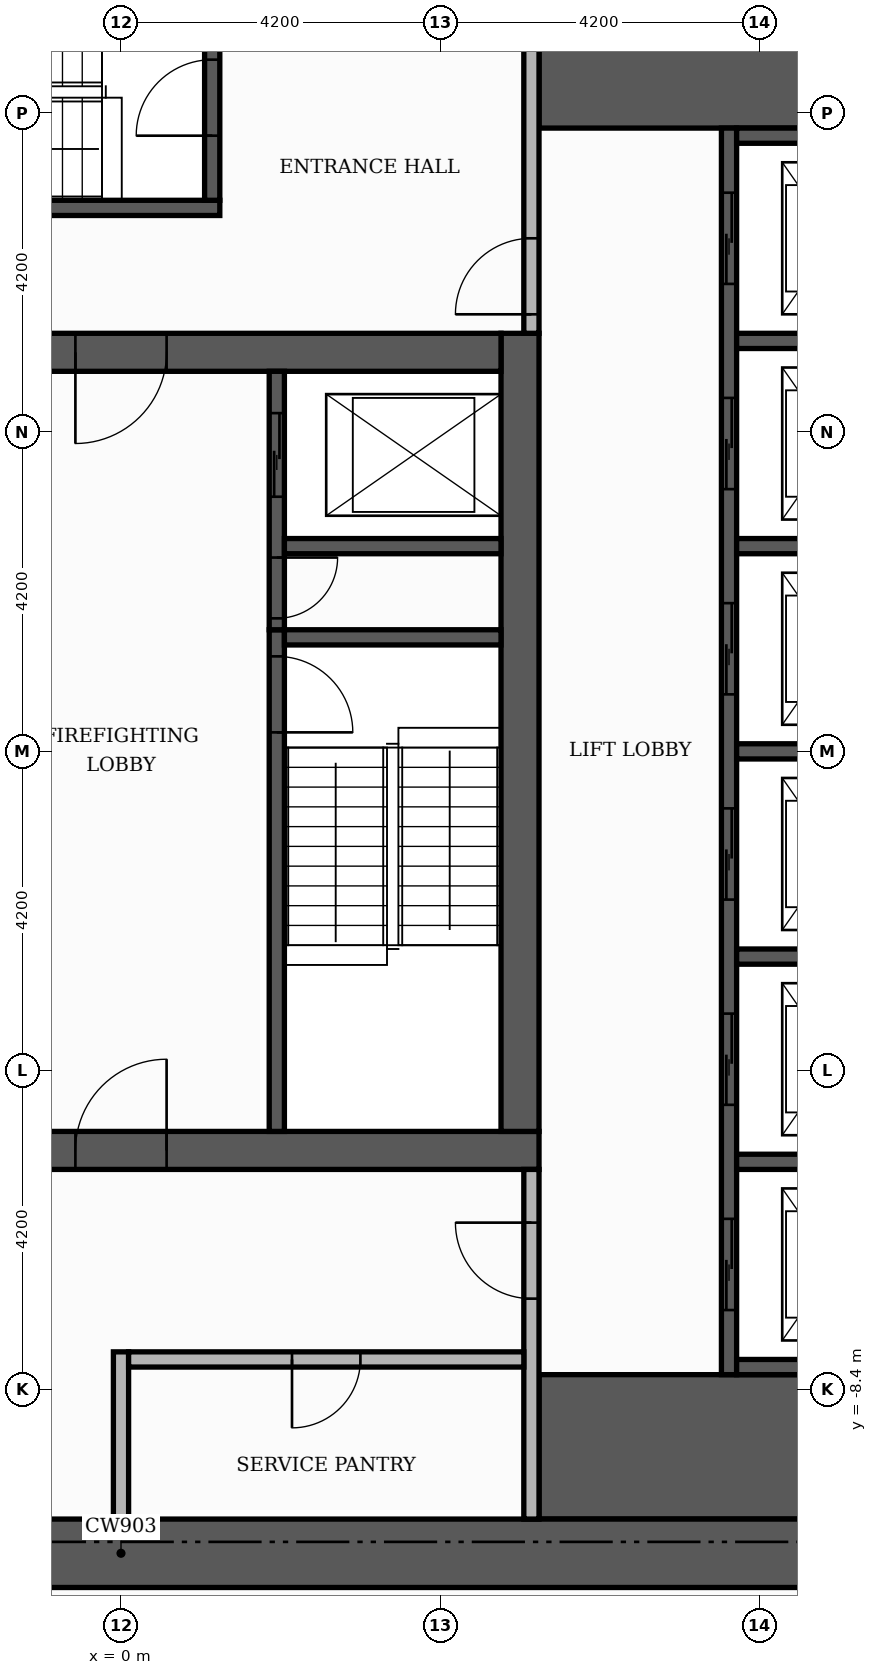
"""IFC4 building model, lengths in metres.
Left out: names, types, materials, properties, quantities, classifications, styles, units other than length and angle.
Written with IfcOpenShell. Run it as: python <this file> out.ifc"""

import sys

from ifc_helpers import new_model, si_unit, direction, frame, frame_2d, origin, place, context, subcontext, project, spatial, rectangle, extrude, element, fill, save


model = new_model("IFC4")
c1 = context("Model", 3, precision=1e-05, world=origin(), true_north=direction((0.0, 1.0)))
c2 = subcontext(c1, "Body", "Model", "MODEL_VIEW")
j1 = project(units=[si_unit("LENGTHUNIT", "METRE"), si_unit("PLANEANGLEUNIT", "RADIAN")], contexts=[c1])
p1 = place(None, origin())
s1 = spatial("IfcSite", under=j1, at=p1, CompositionType="ELEMENT")
p2 = place(p1, origin())
s2 = spatial("IfcBuilding", under=s1, at=p2, CompositionType="ELEMENT")
p3 = place(p2, frame((0.0, 0.0, 141.6)))
s3 = spatial("IfcBuildingStorey", under=s2, at=p3, CompositionType="ELEMENT", Elevation=141.6)
p4 = place(p3, frame((-5.5, -5.25, 0.0), z_axis=(0.0, 0.0, 1.0), x_axis=(1.0, 0.0, 0.0)))
e1 = element("IfcWall", 1, at=p4, inside=s3, PredefinedType="SHEAR", context=c2, shape_type="SweptSolid", body=[
    extrude(rectangle(XDim=11.0, YDim=0.5, at=frame_2d((5.5, 0.0))), origin(), (0.0, 0.0, 1.0), 3.48),
])
p5 = place(p4, frame((4.9, 0.0, 0.0)))
e2 = element("IfcOpeningElement", 2, at=p5, cuts=e1, PredefinedType="OPENING", context=c2, shape_type="SweptSolid", body=[
    extrude(rectangle(XDim=1.2, YDim=2.1, at=frame_2d((0.6, 1.05))), frame((0.0, 0.26, 0.0), z_axis=(0.0, -1.0, 0.0), x_axis=(1.0, 0.0, 0.0)), (0.0, 0.0, 1.0), 0.52),
])
p6 = place(p3, frame((5.25, -5.0, 0.0), z_axis=(0.0, 0.0, 1.0), x_axis=(0.0, 1.0, 0.0)))
e3 = element("IfcWall", 3, at=p6, inside=s3, PredefinedType="SHEAR", context=c2, shape_type="SweptSolid", body=[
    extrude(rectangle(XDim=10.5, YDim=0.5, at=frame_2d((5.25, 0.0))), origin(), (0.0, 0.0, 1.0), 3.48),
])
p7 = place(p3, frame((-5.0, 5.25, 0.0), z_axis=(0.0, 0.0, 1.0), x_axis=(1.0, 0.0, 0.0)))
e4 = element("IfcWall", 4, at=p7, inside=s3, PredefinedType="SHEAR", context=c2, shape_type="SweptSolid", body=[
    extrude(rectangle(XDim=10.0, YDim=0.5, at=frame_2d((5.0, 0.0))), origin(), (0.0, 0.0, 1.0), 3.48),
])
p8 = place(p7, frame((4.4, 0.0, 0.0)))
e5 = element("IfcOpeningElement", 5, at=p8, cuts=e4, PredefinedType="OPENING", context=c2, shape_type="SweptSolid", body=[
    extrude(rectangle(XDim=1.2, YDim=2.1, at=frame_2d((0.6, 1.05))), frame((0.0, 0.26, 0.0), z_axis=(0.0, -1.0, 0.0), x_axis=(1.0, 0.0, 0.0)), (0.0, 0.0, 1.0), 0.52),
])
for number, where, z_axis, x_axis in (
    (6, (5.5, -9.15, 0.0), (0.0, 0.0, 1.0), (1.0, 0.0, 0.0)),
    (7, (5.5, 9.15, 0.0), (0.0, 0.0, 1.0), (1.0, 0.0, 0.0)),
):
    element("IfcWall", number, at=place(p3, frame(where, z_axis=z_axis, x_axis=x_axis)), inside=s3, PredefinedType="SHEAR", context=c2, shape_type="SweptSolid", body=[
        extrude(rectangle(XDim=4.6, YDim=1.9, at=frame_2d((2.3, 0.0))), origin(), (0.0, 0.0, 1.0), 3.48),
    ])
p9 = place(p3, frame((2.05, -5.0, 0.0), z_axis=(0.0, 0.0, 1.0), x_axis=(0.0, 1.0, 0.0)))
e8 = element("IfcWall", 8, at=p9, inside=s3, PredefinedType="SHEAR", context=c2, shape_type="SweptSolid", body=[
    extrude(rectangle(XDim=6.6, YDim=0.2, at=frame_2d((3.3, 0.0))), origin(), (0.0, 0.0, 1.0), 3.48),
])
p10 = place(p9, frame((5.25, 0.0, 0.0)))
e9 = element("IfcOpeningElement", 9, at=p10, cuts=e8, PredefinedType="OPENING", context=c2, shape_type="SweptSolid", body=[
    extrude(rectangle(XDim=1.0, YDim=2.1, at=frame_2d((0.5, 1.05))), frame((0.0, 0.11, 0.0), z_axis=(0.0, -1.0, 0.0), x_axis=(1.0, 0.0, 0.0)), (0.0, 0.0, 1.0), 0.22),
])
p11 = place(p3, frame((2.15, 1.5, 0.0), z_axis=(0.0, 0.0, 1.0), x_axis=(1.0, 0.0, 0.0)))
e10 = element("IfcWall", 10, at=p11, inside=s3, PredefinedType="SHEAR", context=c2, shape_type="SweptSolid", body=[
    extrude(rectangle(XDim=2.85, YDim=0.2, at=frame_2d((1.425, 0.0))), origin(), (0.0, 0.0, 1.0), 3.48),
])
p12 = place(p3, frame((-5.5, 7.15, 0.0), z_axis=(0.0, 0.0, 1.0), x_axis=(1.0, 0.0, 0.0)))
e11 = element("IfcWall", 11, at=p12, inside=s3, PredefinedType="SHEAR", context=c2, shape_type="SweptSolid", body=[
    extrude(rectangle(XDim=6.8, YDim=0.2, at=frame_2d((3.4, 0.0))), origin(), (0.0, 0.0, 1.0), 3.48),
])
p13 = place(p3, frame((1.2, 7.25, 0.0), z_axis=(0.0, 0.0, 1.0), x_axis=(0.0, 1.0, 0.0)))
e12 = element("IfcWall", 12, at=p13, inside=s3, PredefinedType="SHEAR", context=c2, shape_type="SweptSolid", body=[
    extrude(rectangle(XDim=2.85, YDim=0.2, at=frame_2d((1.425, 0.0))), origin(), (0.0, 0.0, 1.0), 3.48),
])
p14 = place(p13, frame((0.85, 0.0, 0.0)))
e13 = element("IfcOpeningElement", 13, at=p14, cuts=e12, PredefinedType="OPENING", context=c2, shape_type="SweptSolid", body=[
    extrude(rectangle(XDim=1.0, YDim=2.1, at=frame_2d((0.5, 1.05))), frame((0.0, 0.11, 0.0), z_axis=(0.0, -1.0, 0.0), x_axis=(1.0, 0.0, 0.0)), (0.0, 0.0, 1.0), 0.22),
])
p15 = place(p3, frame((8.0, -8.2, 0.0), z_axis=(0.0, 0.0, 1.0), x_axis=(0.0, 1.0, 0.0)))
e14 = element("IfcWall", 14, at=p15, inside=s3, PredefinedType="SHEAR", context=c2, shape_type="SweptSolid", body=[
    extrude(rectangle(XDim=16.4, YDim=0.2, at=frame_2d((8.2, 0.0))), origin(), (0.0, 0.0, 1.0), 3.48),
])
p16 = place(p15, frame((0.85, 0.0, 0.0)))
e15 = element("IfcOpeningElement", 15, at=p16, cuts=e14, PredefinedType="OPENING", context=c2, shape_type="SweptSolid", body=[
    extrude(rectangle(XDim=1.2, YDim=2.1, at=frame_2d((0.6, 1.05))), frame((0.0, 0.11, 0.0), z_axis=(0.0, -1.0, 0.0), x_axis=(1.0, 0.0, 0.0)), (0.0, 0.0, 1.0), 0.22),
])
p17 = place(p15, frame((3.55, 0.0, 0.0)))
e16 = element("IfcOpeningElement", 16, at=p17, cuts=e14, PredefinedType="OPENING", context=c2, shape_type="SweptSolid", body=[
    extrude(rectangle(XDim=1.2, YDim=2.1, at=frame_2d((0.6, 1.05))), frame((0.0, 0.11, 0.0), z_axis=(0.0, -1.0, 0.0), x_axis=(1.0, 0.0, 0.0)), (0.0, 0.0, 1.0), 0.22),
])
p18 = place(p15, frame((6.25, 0.0, 0.0)))
e17 = element("IfcOpeningElement", 17, at=p18, cuts=e14, PredefinedType="OPENING", context=c2, shape_type="SweptSolid", body=[
    extrude(rectangle(XDim=1.2, YDim=2.1, at=frame_2d((0.6, 1.05))), frame((0.0, 0.11, 0.0), z_axis=(0.0, -1.0, 0.0), x_axis=(1.0, 0.0, 0.0)), (0.0, 0.0, 1.0), 0.22),
])
p19 = place(p15, frame((8.95, 0.0, 0.0)))
e18 = element("IfcOpeningElement", 18, at=p19, cuts=e14, PredefinedType="OPENING", context=c2, shape_type="SweptSolid", body=[
    extrude(rectangle(XDim=1.2, YDim=2.1, at=frame_2d((0.6, 1.05))), frame((0.0, 0.11, 0.0), z_axis=(0.0, -1.0, 0.0), x_axis=(1.0, 0.0, 0.0)), (0.0, 0.0, 1.0), 0.22),
])
p20 = place(p15, frame((11.65, 0.0, 0.0)))
e19 = element("IfcOpeningElement", 19, at=p20, cuts=e14, PredefinedType="OPENING", context=c2, shape_type="SweptSolid", body=[
    extrude(rectangle(XDim=1.2, YDim=2.1, at=frame_2d((0.6, 1.05))), frame((0.0, 0.11, 0.0), z_axis=(0.0, -1.0, 0.0), x_axis=(1.0, 0.0, 0.0)), (0.0, 0.0, 1.0), 0.22),
])
p21 = place(p15, frame((14.35, 0.0, 0.0)))
e20 = element("IfcOpeningElement", 20, at=p21, cuts=e14, PredefinedType="OPENING", context=c2, shape_type="SweptSolid", body=[
    extrude(rectangle(XDim=1.2, YDim=2.1, at=frame_2d((0.6, 1.05))), frame((0.0, 0.11, 0.0), z_axis=(0.0, -1.0, 0.0), x_axis=(1.0, 0.0, 0.0)), (0.0, 0.0, 1.0), 0.22),
])
for number, where, z_axis, x_axis in (
    (21, (8.1, -8.1, 0.0), (0.0, 0.0, 1.0), (1.0, 0.0, 0.0)),
    (22, (8.1, -5.4, 0.0), (0.0, 0.0, 1.0), (1.0, 0.0, 0.0)),
    (23, (8.1, -2.7, 0.0), (0.0, 0.0, 1.0), (1.0, 0.0, 0.0)),
    (24, (8.1, 0.0, 0.0), (0.0, 0.0, 1.0), (1.0, 0.0, 0.0)),
):
    element("IfcWall", number, at=place(p3, frame(where, z_axis=z_axis, x_axis=x_axis)), inside=s3, PredefinedType="SHEAR", context=c2, shape_type="SweptSolid", body=[
        extrude(rectangle(XDim=2.0, YDim=0.2, at=frame_2d((1.0, 0.0))), origin(), (0.0, 0.0, 1.0), 3.48),
    ])
p22 = place(p3, frame((2.05, 1.6, 0.0), z_axis=(0.0, 0.0, 1.0), x_axis=(0.0, 1.0, 0.0)))
e25 = element("IfcWall", 25, at=p22, inside=s3, PredefinedType="SHEAR", context=c2, shape_type="SweptSolid", body=[
    extrude(rectangle(XDim=3.4, YDim=0.2, at=frame_2d((1.7, 0.0))), origin(), (0.0, 0.0, 1.0), 3.48),
])
p23 = place(p22, frame((1.75, 0.0, 0.0)))
e26 = element("IfcOpeningElement", 26, at=p23, cuts=e25, PredefinedType="OPENING", context=c2, shape_type="SweptSolid", body=[
    extrude(rectangle(XDim=1.1, YDim=2.1, at=frame_2d((0.55, 1.05))), frame((0.0, 0.11, 0.0), z_axis=(0.0, -1.0, 0.0), x_axis=(1.0, 0.0, 0.0)), (0.0, 0.0, 1.0), 0.22),
])
p24 = place(p22, frame((0.15, 0.0, 0.0)))
e27 = element("IfcOpeningElement", 27, at=p24, cuts=e25, PredefinedType="OPENING", context=c2, shape_type="SweptSolid", body=[
    extrude(rectangle(XDim=0.8, YDim=2.1, at=frame_2d((0.4, 1.05))), frame((0.0, 0.11, 0.0), z_axis=(0.0, -1.0, 0.0), x_axis=(1.0, 0.0, 0.0)), (0.0, 0.0, 1.0), 0.22),
])
p25 = place(p3, frame((2.15, 2.7, 0.0), z_axis=(0.0, 0.0, 1.0), x_axis=(1.0, 0.0, 0.0)))
e28 = element("IfcWall", 28, at=p25, inside=s3, PredefinedType="SHEAR", context=c2, shape_type="SweptSolid", body=[
    extrude(rectangle(XDim=2.85, YDim=0.2, at=frame_2d((1.425, 0.0))), origin(), (0.0, 0.0, 1.0), 3.48),
])
for number, where, z_axis, x_axis in (
    (29, (8.1, 2.7, 0.0), (0.0, 0.0, 1.0), (1.0, 0.0, 0.0)),
    (30, (8.1, 5.4, 0.0), (0.0, 0.0, 1.0), (1.0, 0.0, 0.0)),
    (31, (8.1, 8.1, 0.0), (0.0, 0.0, 1.0), (1.0, 0.0, 0.0)),
):
    element("IfcWall", number, at=place(p3, frame(where, z_axis=z_axis, x_axis=x_axis)), inside=s3, PredefinedType="SHEAR", context=c2, shape_type="SweptSolid", body=[
        extrude(rectangle(XDim=2.0, YDim=0.2, at=frame_2d((1.0, 0.0))), origin(), (0.0, 0.0, 1.0), 3.48),
    ])
p26 = place(p3, frame((-11.0, -10.55, 0.0), z_axis=(0.0, 0.0, 1.0), x_axis=(1.0, 0.0, 0.0)))
e32 = element("IfcWall", 32, at=p26, inside=s3, PredefinedType="SHEAR", context=c2, shape_type="SweptSolid", body=[
    extrude(rectangle(XDim=22.0, YDim=0.9, at=frame_2d((11.0, 0.0))), origin(), (0.0, 0.0, 1.0), 3.48),
])
p27 = place(p26, frame((7.4, 0.0, 0.0)))
e33 = element("IfcOpeningElement", 33, at=p27, cuts=e32, PredefinedType="OPENING", context=c2, shape_type="SweptSolid", body=[
    extrude(rectangle(XDim=1.8, YDim=2.2, at=frame_2d((0.9, 1.1))), frame((0.0, 0.46, 0.0), z_axis=(0.0, -1.0, 0.0), x_axis=(1.0, 0.0, 0.0)), (0.0, 0.0, 1.0), 0.92),
])
p28 = place(p3, frame((0.0, -10.1, 0.0), z_axis=(0.0, 0.0, 1.0), x_axis=(0.0, 1.0, 0.0)))
e34 = element("IfcWall", 34, at=p28, inside=s3, PredefinedType="PARTITIONING", context=c2, shape_type="SweptSolid", body=[
    extrude(rectangle(XDim=2.2, YDim=0.2, at=frame_2d((1.1, 0.0))), origin(), (0.0, 0.0, 1.0), 3.48),
])
p29 = place(p3, frame((5.4, -10.1, 0.0), z_axis=(0.0, 0.0, 1.0), x_axis=(0.0, 1.0, 0.0)))
e35 = element("IfcWall", 35, at=p29, inside=s3, PredefinedType="PARTITIONING", context=c2, shape_type="SweptSolid", body=[
    extrude(rectangle(XDim=4.6, YDim=0.2, at=frame_2d((2.3, 0.0))), origin(), (0.0, 0.0, 1.0), 3.48),
])
p30 = place(p29, frame((2.9, 0.0, 0.0)))
e36 = element("IfcOpeningElement", 36, at=p30, cuts=e35, PredefinedType="OPENING", context=c2, shape_type="SweptSolid", body=[
    extrude(rectangle(XDim=1.0, YDim=2.1, at=frame_2d((0.5, 1.05))), frame((0.0, 0.11, 0.0), z_axis=(0.0, -1.0, 0.0), x_axis=(1.0, 0.0, 0.0)), (0.0, 0.0, 1.0), 0.22),
])
p31 = place(p3, frame((0.1, -8.0, 0.0), z_axis=(0.0, 0.0, 1.0), x_axis=(1.0, 0.0, 0.0)))
e37 = element("IfcWall", 37, at=p31, inside=s3, PredefinedType="PARTITIONING", context=c2, shape_type="SweptSolid", body=[
    extrude(rectangle(XDim=5.2, YDim=0.2, at=frame_2d((2.6, 0.0))), origin(), (0.0, 0.0, 1.0), 3.48),
])
p32 = place(p31, frame((2.15, 0.0, 0.0)))
e38 = element("IfcOpeningElement", 38, at=p32, cuts=e37, PredefinedType="OPENING", context=c2, shape_type="SweptSolid", body=[
    extrude(rectangle(XDim=0.9, YDim=2.1, at=frame_2d((0.45, 1.05))), frame((0.0, 0.11, 0.0), z_axis=(0.0, -1.0, 0.0), x_axis=(1.0, 0.0, 0.0)), (0.0, 0.0, 1.0), 0.22),
])
p33 = place(p3, frame((5.4, 5.5, 0.0), z_axis=(0.0, 0.0, 1.0), x_axis=(0.0, 1.0, 0.0)))
e39 = element("IfcWall", 39, at=p33, inside=s3, PredefinedType="PARTITIONING", context=c2, shape_type="SweptSolid", body=[
    extrude(rectangle(XDim=4.6, YDim=0.2, at=frame_2d((2.3, 0.0))), origin(), (0.0, 0.0, 1.0), 3.48),
])
p34 = place(p33, frame((0.25, 0.0, 0.0)))
e40 = element("IfcOpeningElement", 40, at=p34, cuts=e39, PredefinedType="OPENING", context=c2, shape_type="SweptSolid", body=[
    extrude(rectangle(XDim=1.0, YDim=2.1, at=frame_2d((0.5, 1.05))), frame((0.0, 0.11, 0.0), z_axis=(0.0, -1.0, 0.0), x_axis=(1.0, 0.0, 0.0)), (0.0, 0.0, 1.0), 0.22),
])
p35 = place(p16, origin())
e41 = element("IfcDoor", 41, at=p35, inside=s3, OperationType="SLIDING_TO_LEFT", PredefinedType="DOOR", context=c2, shape_type="SweptSolid", body=[
    extrude(rectangle(XDim=1.2, YDim=2.1, at=frame_2d((0.6, 1.05))), frame((0.0, 0.025, 0.0), z_axis=(0.0, -1.0, 0.0), x_axis=(1.0, 0.0, 0.0)), (0.0, 0.0, 1.0), 0.05),
])
fill(e15, e41)
p36 = place(p17, origin())
e42 = element("IfcDoor", 42, at=p36, inside=s3, OperationType="SLIDING_TO_LEFT", PredefinedType="DOOR", context=c2, shape_type="SweptSolid", body=[
    extrude(rectangle(XDim=1.2, YDim=2.1, at=frame_2d((0.6, 1.05))), frame((0.0, 0.025, 0.0), z_axis=(0.0, -1.0, 0.0), x_axis=(1.0, 0.0, 0.0)), (0.0, 0.0, 1.0), 0.05),
])
fill(e16, e42)
p37 = place(p18, origin())
e43 = element("IfcDoor", 43, at=p37, inside=s3, OperationType="SLIDING_TO_LEFT", PredefinedType="DOOR", context=c2, shape_type="SweptSolid", body=[
    extrude(rectangle(XDim=1.2, YDim=2.1, at=frame_2d((0.6, 1.05))), frame((0.0, 0.025, 0.0), z_axis=(0.0, -1.0, 0.0), x_axis=(1.0, 0.0, 0.0)), (0.0, 0.0, 1.0), 0.05),
])
fill(e17, e43)
p38 = place(p19, origin())
e44 = element("IfcDoor", 44, at=p38, inside=s3, OperationType="SLIDING_TO_LEFT", PredefinedType="DOOR", context=c2, shape_type="SweptSolid", body=[
    extrude(rectangle(XDim=1.2, YDim=2.1, at=frame_2d((0.6, 1.05))), frame((0.0, 0.025, 0.0), z_axis=(0.0, -1.0, 0.0), x_axis=(1.0, 0.0, 0.0)), (0.0, 0.0, 1.0), 0.05),
])
fill(e18, e44)
p39 = place(p20, origin())
e45 = element("IfcDoor", 45, at=p39, inside=s3, OperationType="SLIDING_TO_LEFT", PredefinedType="DOOR", context=c2, shape_type="SweptSolid", body=[
    extrude(rectangle(XDim=1.2, YDim=2.1, at=frame_2d((0.6, 1.05))), frame((0.0, 0.025, 0.0), z_axis=(0.0, -1.0, 0.0), x_axis=(1.0, 0.0, 0.0)), (0.0, 0.0, 1.0), 0.05),
])
fill(e19, e45)
p40 = place(p21, origin())
e46 = element("IfcDoor", 46, at=p40, inside=s3, OperationType="SLIDING_TO_LEFT", PredefinedType="DOOR", context=c2, shape_type="SweptSolid", body=[
    extrude(rectangle(XDim=1.2, YDim=2.1, at=frame_2d((0.6, 1.05))), frame((0.0, 0.025, 0.0), z_axis=(0.0, -1.0, 0.0), x_axis=(1.0, 0.0, 0.0)), (0.0, 0.0, 1.0), 0.05),
])
fill(e20, e46)
p41 = place(p23, origin())
e47 = element("IfcDoor", 47, at=p41, inside=s3, OperationType="SLIDING_TO_LEFT", PredefinedType="DOOR", context=c2, shape_type="SweptSolid", body=[
    extrude(rectangle(XDim=1.1, YDim=2.1, at=frame_2d((0.55, 1.05))), frame((0.0, 0.025, 0.0), z_axis=(0.0, -1.0, 0.0), x_axis=(1.0, 0.0, 0.0)), (0.0, 0.0, 1.0), 0.05),
])
fill(e26, e47)
p42 = place(p10, frame((1.0, 0.0, 0.0), z_axis=(0.0, 0.0, 1.0), x_axis=(-1.0, 0.0, 0.0)))
e48 = element("IfcDoor", 48, at=p42, inside=s3, OperationType="SINGLE_SWING_LEFT", PredefinedType="DOOR", context=c2, shape_type="SweptSolid", body=[
    extrude(rectangle(XDim=1.0, YDim=2.1, at=frame_2d((0.5, 1.05))), frame((0.0, 0.025, 0.0), z_axis=(0.0, -1.0, 0.0), x_axis=(1.0, 0.0, 0.0)), (0.0, 0.0, 1.0), 0.05),
])
fill(e9, e48)
p43 = place(p24, frame((0.8, 0.0, 0.0), z_axis=(0.0, 0.0, 1.0), x_axis=(-1.0, 0.0, 0.0)))
e49 = element("IfcDoor", 49, at=p43, inside=s3, OperationType="SINGLE_SWING_RIGHT", PredefinedType="DOOR", context=c2, shape_type="SweptSolid", body=[
    extrude(rectangle(XDim=0.8, YDim=2.1, at=frame_2d((0.4, 1.05))), frame((0.0, 0.025, 0.0), z_axis=(0.0, -1.0, 0.0), x_axis=(1.0, 0.0, 0.0)), (0.0, 0.0, 1.0), 0.05),
])
fill(e27, e49)
p44 = place(p8, frame((1.2, 0.0, 0.0), z_axis=(0.0, 0.0, 1.0), x_axis=(-1.0, 0.0, 0.0)))
e50 = element("IfcDoor", 50, at=p44, inside=s3, OperationType="SINGLE_SWING_LEFT", PredefinedType="DOOR", context=c2, shape_type="SweptSolid", body=[
    extrude(rectangle(XDim=1.2, YDim=2.1, at=frame_2d((0.6, 1.05))), frame((0.0, 0.025, 0.0), z_axis=(0.0, -1.0, 0.0), x_axis=(1.0, 0.0, 0.0)), (0.0, 0.0, 1.0), 0.05),
])
fill(e5, e50)
p45 = place(p5, origin())
e51 = element("IfcDoor", 51, at=p45, inside=s3, OperationType="SINGLE_SWING_RIGHT", PredefinedType="DOOR", context=c2, shape_type="SweptSolid", body=[
    extrude(rectangle(XDim=1.2, YDim=2.1, at=frame_2d((0.6, 1.05))), frame((0.0, 0.025, 0.0), z_axis=(0.0, -1.0, 0.0), x_axis=(1.0, 0.0, 0.0)), (0.0, 0.0, 1.0), 0.05),
])
fill(e2, e51)
p46 = place(p14, origin())
e52 = element("IfcDoor", 52, at=p46, inside=s3, OperationType="SINGLE_SWING_LEFT", PredefinedType="DOOR", context=c2, shape_type="SweptSolid", body=[
    extrude(rectangle(XDim=1.0, YDim=2.1, at=frame_2d((0.5, 1.05))), frame((0.0, 0.025, 0.0), z_axis=(0.0, -1.0, 0.0), x_axis=(1.0, 0.0, 0.0)), (0.0, 0.0, 1.0), 0.05),
])
fill(e13, e52)
p47 = place(p34, origin())
e53 = element("IfcDoor", 53, at=p47, inside=s3, OperationType="SINGLE_SWING_LEFT", PredefinedType="DOOR", context=c2, shape_type="SweptSolid", body=[
    extrude(rectangle(XDim=1.0, YDim=2.1, at=frame_2d((0.5, 1.05))), frame((0.0, 0.025, 0.0), z_axis=(0.0, -1.0, 0.0), x_axis=(1.0, 0.0, 0.0)), (0.0, 0.0, 1.0), 0.05),
])
fill(e40, e53)
p48 = place(p30, origin())
e54 = element("IfcDoor", 54, at=p48, inside=s3, OperationType="SINGLE_SWING_RIGHT", PredefinedType="DOOR", context=c2, shape_type="SweptSolid", body=[
    extrude(rectangle(XDim=1.0, YDim=2.1, at=frame_2d((0.5, 1.05))), frame((0.0, 0.025, 0.0), z_axis=(0.0, -1.0, 0.0), x_axis=(1.0, 0.0, 0.0)), (0.0, 0.0, 1.0), 0.05),
])
fill(e36, e54)
p49 = place(p32, frame((0.9, 0.0, 0.0), z_axis=(0.0, 0.0, 1.0), x_axis=(-1.0, 0.0, 0.0)))
e55 = element("IfcDoor", 55, at=p49, inside=s3, OperationType="SINGLE_SWING_LEFT", PredefinedType="DOOR", context=c2, shape_type="SweptSolid", body=[
    extrude(rectangle(XDim=0.9, YDim=2.1, at=frame_2d((0.45, 1.05))), frame((0.0, 0.025, 0.0), z_axis=(0.0, -1.0, 0.0), x_axis=(1.0, 0.0, 0.0)), (0.0, 0.0, 1.0), 0.05),
])
fill(e38, e55)
save(model, sys.argv[1])
